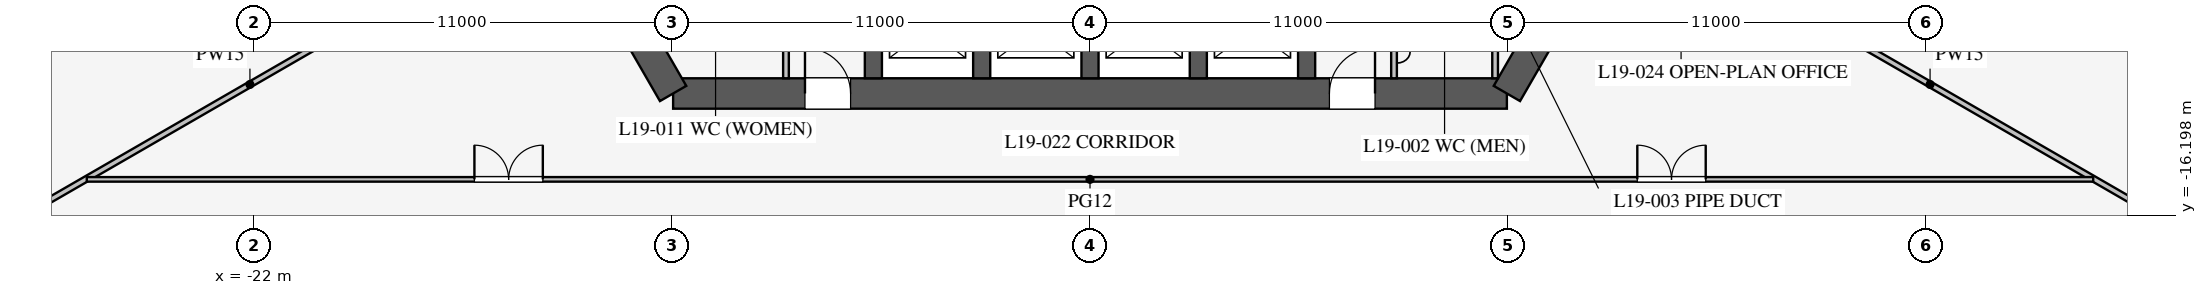
"""IFC4 building model, lengths in metres.
Left out: names, types, materials, properties, quantities, classifications, styles, units other than length and angle.
Written with IfcOpenShell. Run it as: python <this file> out.ifc"""

import sys

from ifc_helpers import new_model, si_unit, direction, frame, frame_2d, origin, place, context, subcontext, project, spatial, rectangle, extrude, element, fill, save


model = new_model("IFC4")
c1 = context("Model", 3, precision=1e-05, world=origin(), true_north=direction((0.0, 1.0)))
c2 = subcontext(c1, "Body", "Model", "MODEL_VIEW")
j1 = project(units=[si_unit("LENGTHUNIT", "METRE"), si_unit("PLANEANGLEUNIT", "RADIAN")], contexts=[c1])
p1 = place(None, origin())
s1 = spatial("IfcSite", under=j1, at=p1, CompositionType="ELEMENT")
p2 = place(p1, origin())
s2 = spatial("IfcBuilding", under=s1, at=p2, CompositionType="ELEMENT")
p3 = place(p2, frame((0.0, 0.0, 83.7)))
s3 = spatial("IfcBuildingStorey", under=s2, at=p3, CompositionType="ELEMENT", Elevation=83.7)
p4 = place(p3, frame((-10.97, -13.0, 0.0), z_axis=(0.0, 0.0, 1.0), x_axis=(1.0, 0.0, 0.0)))
e1 = element("IfcWall", 1, at=p4, inside=s3, PredefinedType="SHEAR", context=c2, shape_type="SweptSolid", body=[
    extrude(rectangle(XDim=21.939, YDim=0.8, at=frame_2d((10.97, 0.0))), origin(), (0.0, 0.0, 1.0), 4.2),
])
p5 = place(p4, frame((17.27, 0.0, 0.0)))
e2 = element("IfcOpeningElement", 2, at=p5, cuts=e1, PredefinedType="OPENING", context=c2, shape_type="SweptSolid", body=[
    extrude(rectangle(XDim=1.2, YDim=2.1, at=frame_2d((0.6, 1.05))), frame((0.0, 0.41, 0.0), z_axis=(0.0, -1.0, 0.0), x_axis=(1.0, 0.0, 0.0)), (0.0, 0.0, 1.0), 0.82),
])
p6 = place(p4, frame((3.47, 0.0, 0.0)))
e3 = element("IfcOpeningElement", 3, at=p6, cuts=e1, PredefinedType="OPENING", context=c2, shape_type="SweptSolid", body=[
    extrude(rectangle(XDim=1.2, YDim=2.1, at=frame_2d((0.6, 1.05))), frame((0.0, 0.41, 0.0), z_axis=(0.0, -1.0, 0.0), x_axis=(1.0, 0.0, 0.0)), (0.0, 0.0, 1.0), 0.82),
])
for number, where, z_axis, x_axis in (
    (4, (10.97, -13.0, 0.0), (0.0, 0.0, 1.0), (0.5, 0.866, 0.0)),
    (5, (-16.743, -3.0, 0.0), (0.0, 0.0, 1.0), (0.5, -0.866, 0.0)),
):
    element("IfcWall", number, at=place(p3, frame(where, z_axis=z_axis, x_axis=x_axis)), inside=s3, PredefinedType="SHEAR", context=c2, shape_type="SweptSolid", body=[
        extrude(rectangle(XDim=11.547, YDim=0.8, at=frame_2d((5.773, 0.0))), origin(), (0.0, 0.0, 1.0), 4.2),
    ])
for number, where, z_axis, x_axis in (
    (6, (-5.7, -10.025, 0.0), (0.0, 0.0, 1.0), (0.0, -1.0, 0.0)),
    (7, (-2.85, -10.025, 0.0), (0.0, 0.0, 1.0), (0.0, -1.0, 0.0)),
    (8, (0.0, -10.025, 0.0), (0.0, 0.0, 1.0), (0.0, -1.0, 0.0)),
    (9, (2.85, -10.025, 0.0), (0.0, 0.0, 1.0), (0.0, -1.0, 0.0)),
    (10, (5.7, -10.025, 0.0), (0.0, 0.0, 1.0), (0.0, -1.0, 0.0)),
):
    element("IfcWall", number, at=place(p3, frame(where, z_axis=z_axis, x_axis=x_axis)), inside=s3, PredefinedType="SHEAR", context=c2, shape_type="SweptSolid", body=[
        extrude(rectangle(XDim=2.575, YDim=0.45, at=frame_2d((1.288, 0.0))), origin(), (0.0, 0.0, 1.0), 4.2),
    ])
p7 = place(p3, frame((8.0, -7.5, 0.0), z_axis=(0.0, 0.0, 1.0), x_axis=(0.0, -1.0, 0.0)))
e11 = element("IfcWall", 11, at=p7, inside=s3, PredefinedType="PARTITIONING", context=c2, shape_type="SweptSolid", body=[
    extrude(rectangle(XDim=5.1, YDim=0.15, at=frame_2d((2.55, 0.0))), origin(), (0.0, 0.0, 1.0), 4.0),
])
p8 = place(p7, frame((1.3, 0.0, 0.0)))
e12 = element("IfcOpeningElement", 12, at=p8, cuts=e11, PredefinedType="OPENING", context=c2, shape_type="SweptSolid", body=[
    extrude(rectangle(XDim=0.9, YDim=2.1, at=frame_2d((0.45, 1.05))), frame((0.0, 0.085, 0.0), z_axis=(0.0, -1.0, 0.0), x_axis=(1.0, 0.0, 0.0)), (0.0, 0.0, 1.0), 0.17),
])
p9 = place(p3, frame((-8.0, -7.5, 0.0), z_axis=(0.0, 0.0, 1.0), x_axis=(0.0, -1.0, 0.0)))
e13 = element("IfcWall", 13, at=p9, inside=s3, PredefinedType="PARTITIONING", context=c2, shape_type="SweptSolid", body=[
    extrude(rectangle(XDim=5.1, YDim=0.15, at=frame_2d((2.55, 0.0))), origin(), (0.0, 0.0, 1.0), 4.0),
])
p10 = place(p9, frame((2.6, 0.0, 0.0)))
e14 = element("IfcOpeningElement", 14, at=p10, cuts=e13, PredefinedType="OPENING", context=c2, shape_type="SweptSolid", body=[
    extrude(rectangle(XDim=0.9, YDim=2.1, at=frame_2d((0.45, 1.05))), frame((0.0, 0.085, 0.0), z_axis=(0.0, -1.0, 0.0), x_axis=(1.0, 0.0, 0.0)), (0.0, 0.0, 1.0), 0.17),
])
p11 = place(p3, frame((10.66, -8.5, 0.0), z_axis=(0.0, 0.0, 1.0), x_axis=(0.0, -1.0, 0.0)))
e15 = element("IfcWall", 15, at=p11, inside=s3, PredefinedType="PARTITIONING", context=c2, shape_type="SweptSolid", body=[
    extrude(rectangle(XDim=4.1, YDim=0.15, at=frame_2d((2.05, 0.0))), origin(), (0.0, 0.0, 1.0), 4.0),
])
for number, where, z_axis, x_axis in (
    (16, (14.203, -8.2, 0.0), (0.0, 0.0, 1.0), (0.866, -0.5, 0.0)),
    (17, (-14.203, -8.2, 0.0), (0.0, 0.0, 1.0), (-0.866, -0.5, 0.0)),
):
    element("IfcWall", number, at=place(p3, frame(where, z_axis=z_axis, x_axis=x_axis)), inside=s3, PredefinedType="PARTITIONING", context=c2, shape_type="SweptSolid", body=[
        extrude(rectangle(XDim=18.25, YDim=0.15, at=frame_2d((9.125, 0.0))), origin(), (0.0, 0.0, 1.0), 2.3),
    ])
p12 = place(p3, frame((-26.398, -15.26, 0.0), z_axis=(0.0, 0.0, 1.0), x_axis=(1.0, 0.0, 0.0)))
e18 = element("IfcWall", 18, at=p12, inside=s3, PredefinedType="PARTITIONING", context=c2, shape_type="SweptSolid", body=[
    extrude(rectangle(XDim=52.796, YDim=0.12, at=frame_2d((26.398, 0.0))), origin(), (0.0, 0.0, 1.0), 2.9),
])
p13 = place(p12, frame((10.2, 0.0, 0.15)))
e19 = element("IfcOpeningElement", 19, at=p13, cuts=e18, PredefinedType="OPENING", context=c2, shape_type="SweptSolid", body=[
    extrude(rectangle(XDim=1.8, YDim=2.1, at=frame_2d((0.9, 1.05))), frame((0.0, 0.07, 0.0), z_axis=(0.0, -1.0, 0.0), x_axis=(1.0, 0.0, 0.0)), (0.0, 0.0, 1.0), 0.14),
])
p14 = place(p12, frame((40.8, 0.0, 0.15)))
e20 = element("IfcOpeningElement", 20, at=p14, cuts=e18, PredefinedType="OPENING", context=c2, shape_type="SweptSolid", body=[
    extrude(rectangle(XDim=1.8, YDim=2.1, at=frame_2d((0.9, 1.05))), frame((0.0, 0.07, 0.0), z_axis=(0.0, -1.0, 0.0), x_axis=(1.0, 0.0, 0.0)), (0.0, 0.0, 1.0), 0.14),
])
p15 = place(p5, origin())
e21 = element("IfcDoor", 21, at=p15, inside=s3, OperationType="SINGLE_SWING_RIGHT", PredefinedType="DOOR", context=c2, shape_type="SweptSolid", body=[
    extrude(rectangle(XDim=1.2, YDim=2.1, at=frame_2d((0.6, 1.05))), frame((0.0, 0.025, 0.0), z_axis=(0.0, -1.0, 0.0), x_axis=(1.0, 0.0, 0.0)), (0.0, 0.0, 1.0), 0.05),
])
fill(e2, e21)
p16 = place(p6, origin())
e22 = element("IfcDoor", 22, at=p16, inside=s3, OperationType="SINGLE_SWING_LEFT", PredefinedType="DOOR", context=c2, shape_type="SweptSolid", body=[
    extrude(rectangle(XDim=1.2, YDim=2.1, at=frame_2d((0.6, 1.05))), frame((0.0, 0.025, 0.0), z_axis=(0.0, -1.0, 0.0), x_axis=(1.0, 0.0, 0.0)), (0.0, 0.0, 1.0), 0.05),
])
fill(e3, e22)
p17 = place(p13, origin())
e23 = element("IfcDoor", 23, at=p17, inside=s3, OperationType="DOUBLE_DOOR_SINGLE_SWING", PredefinedType="DOOR", context=c2, shape_type="SweptSolid", body=[
    extrude(rectangle(XDim=1.8, YDim=2.1, at=frame_2d((0.9, 1.05))), frame((0.0, 0.025, 0.0), z_axis=(0.0, -1.0, 0.0), x_axis=(1.0, 0.0, 0.0)), (0.0, 0.0, 1.0), 0.05),
])
fill(e19, e23)
p18 = place(p14, origin())
e24 = element("IfcDoor", 24, at=p18, inside=s3, OperationType="DOUBLE_DOOR_SINGLE_SWING", PredefinedType="DOOR", context=c2, shape_type="SweptSolid", body=[
    extrude(rectangle(XDim=1.8, YDim=2.1, at=frame_2d((0.9, 1.05))), frame((0.0, 0.025, 0.0), z_axis=(0.0, -1.0, 0.0), x_axis=(1.0, 0.0, 0.0)), (0.0, 0.0, 1.0), 0.05),
])
fill(e20, e24)
save(model, sys.argv[1])
